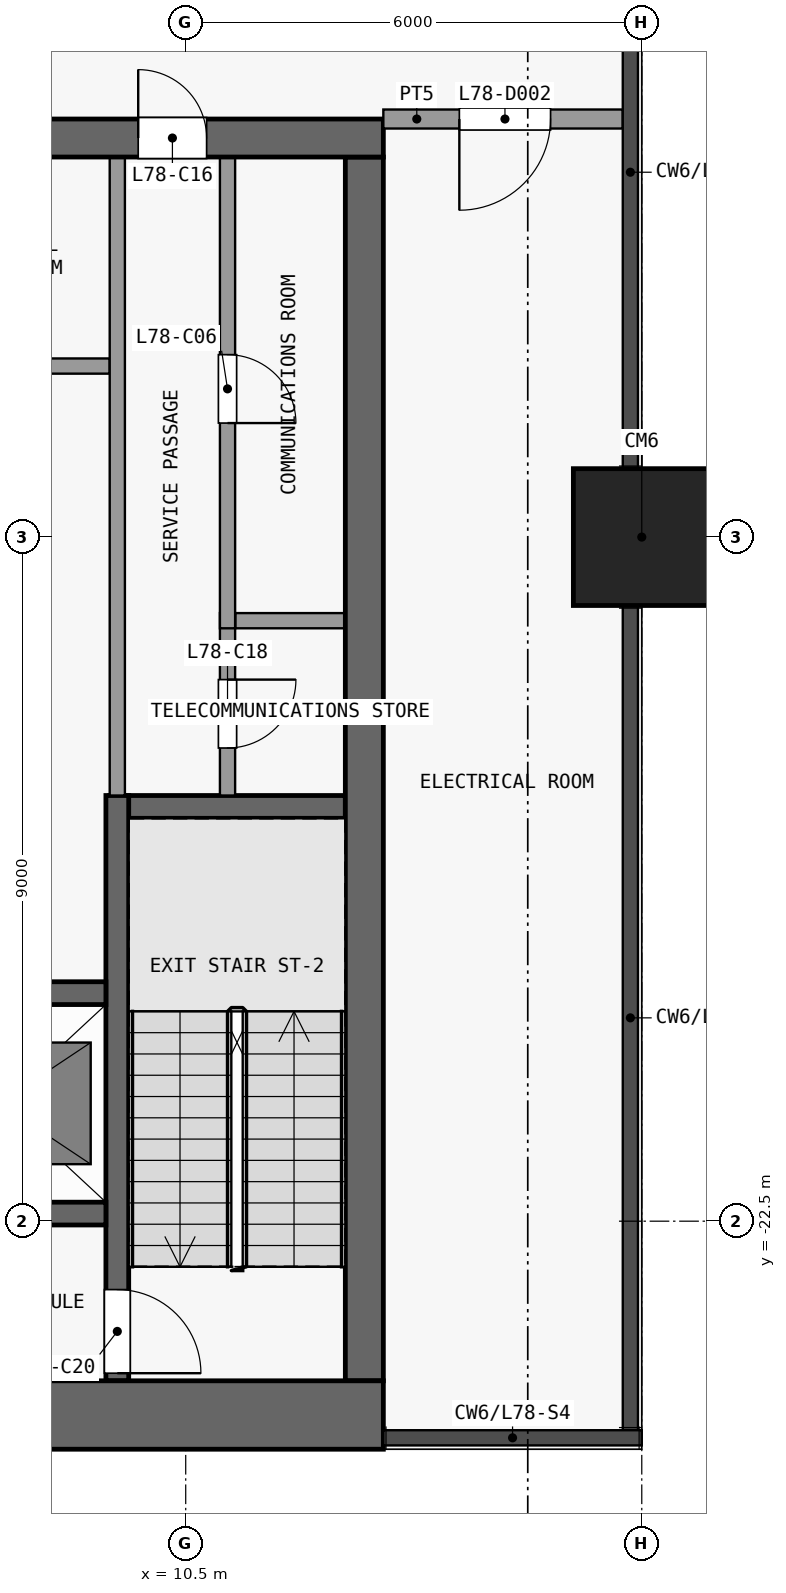
"""IFC4 building model, lengths in metres.
Left out: names, types, materials, properties, quantities, classifications, styles, units other than length and angle.
Written with IfcOpenShell. Run it as: python <this file> out.ifc"""

import sys

from ifc_helpers import new_model, si_unit, direction, frame, frame_2d, origin, origin_2d, place, context, subcontext, project, spatial, rectangle, extrude, element, fill, save


model = new_model("IFC4")
c1 = context("Model", 3, precision=1e-05, world=origin(), true_north=direction((0.0, 1.0)))
c2 = subcontext(c1, "Body", "Model", "MODEL_VIEW")
j1 = project(units=[si_unit("LENGTHUNIT", "METRE"), si_unit("PLANEANGLEUNIT", "RADIAN")], contexts=[c1])
p1 = place(None, origin())
s1 = spatial("IfcSite", under=j1, at=p1, CompositionType="ELEMENT")
p2 = place(p1, origin())
s2 = spatial("IfcBuilding", under=s1, at=p2, CompositionType="ELEMENT")
p3 = place(p2, frame((0.0, 0.0, 307.7)))
s3 = spatial("IfcBuildingStorey", under=s2, at=p3, CompositionType="ELEMENT", Elevation=307.7)
p4 = place(p3, frame((16.5, -13.5, 0.0), z_axis=(0.0, 0.0, 1.0), x_axis=(1.0, 0.0, 0.0)))
e1 = element("IfcColumn", 1, at=p4, inside=s3, PredefinedType="COLUMN", context=c2, shape_type="SweptSolid", body=[
    extrude(rectangle(XDim=1.8, YDim=1.8, at=origin_2d()), origin(), (0.0, 0.0, 1.0), 4.5),
])
p5 = place(p3, frame((-13.1, -25.05, 0.0), z_axis=(0.0, 0.0, 1.0), x_axis=(1.0, 0.0, 0.0)))
e2 = element("IfcWall", 2, at=p5, inside=s3, PredefinedType="SHEAR", context=c2, shape_type="SweptSolid", body=[
    extrude(rectangle(XDim=26.2, YDim=0.9, at=frame_2d((13.1, 0.0))), origin(), (0.0, 0.0, 1.0), 4.1),
])
p6 = place(p3, frame((-13.1, -8.25, 0.0), z_axis=(0.0, 0.0, 1.0), x_axis=(1.0, 0.0, 0.0)))
e3 = element("IfcWall", 3, at=p6, inside=s3, PredefinedType="SHEAR", context=c2, shape_type="SweptSolid", body=[
    extrude(rectangle(XDim=26.2, YDim=0.5, at=frame_2d((13.1, 0.0))), origin(), (0.0, 0.0, 1.0), 4.1),
])
p7 = place(p6, frame((7.4, 0.0, 0.0)))
e4 = element("IfcOpeningElement", 4, at=p7, cuts=e3, PredefinedType="OPENING", context=c2, shape_type="SweptSolid", body=[
    extrude(rectangle(XDim=1.8, YDim=2.1, at=frame_2d((0.9, 1.05))), frame((0.0, 0.26, 0.0), z_axis=(0.0, -1.0, 0.0), x_axis=(1.0, 0.0, 0.0)), (0.0, 0.0, 1.0), 0.52),
])
p8 = place(p6, frame((17.0, 0.0, 0.0)))
e5 = element("IfcOpeningElement", 5, at=p8, cuts=e3, PredefinedType="OPENING", context=c2, shape_type="SweptSolid", body=[
    extrude(rectangle(XDim=1.8, YDim=2.1, at=frame_2d((0.9, 1.05))), frame((0.0, 0.26, 0.0), z_axis=(0.0, -1.0, 0.0), x_axis=(1.0, 0.0, 0.0)), (0.0, 0.0, 1.0), 0.52),
])
p9 = place(p6, frame((1.325, 0.0, 0.0)))
e6 = element("IfcOpeningElement", 6, at=p9, cuts=e3, PredefinedType="OPENING", context=c2, shape_type="SweptSolid", body=[
    extrude(rectangle(XDim=1.2, YDim=2.1, at=frame_2d((0.6, 1.05))), frame((0.0, 0.26, 0.0), z_axis=(0.0, -1.0, 0.0), x_axis=(1.0, 0.0, 0.0)), (0.0, 0.0, 1.0), 0.52),
])
p10 = place(p6, frame((22.975, 0.0, 0.0)))
e7 = element("IfcOpeningElement", 7, at=p10, cuts=e3, PredefinedType="OPENING", context=c2, shape_type="SweptSolid", body=[
    extrude(rectangle(XDim=0.9, YDim=2.1, at=frame_2d((0.45, 1.05))), frame((0.0, 0.26, 0.0), z_axis=(0.0, -1.0, 0.0), x_axis=(1.0, 0.0, 0.0)), (0.0, 0.0, 1.0), 0.52),
])
p11 = place(p3, frame((12.85, -24.6, 0.0), z_axis=(0.0, 0.0, 1.0), x_axis=(0.0, 1.0, 0.0)))
e8 = element("IfcWall", 8, at=p11, inside=s3, PredefinedType="SHEAR", context=c2, shape_type="SweptSolid", body=[
    extrude(rectangle(XDim=16.1, YDim=0.5, at=frame_2d((8.05, 0.0))), origin(), (0.0, 0.0, 1.0), 4.1),
])
p12 = place(p3, frame((6.35, -22.4, 0.0), z_axis=(0.0, 0.0, 1.0), x_axis=(1.0, 0.0, 0.0)))
e9 = element("IfcWall", 9, at=p12, inside=s3, PredefinedType="SHEAR", context=c2, shape_type="SweptSolid", body=[
    extrude(rectangle(XDim=3.1, YDim=0.3, at=frame_2d((1.55, 0.0))), origin(), (0.0, 0.0, 1.0), 4.1),
])
p13 = place(p3, frame((6.4, -19.5, 0.0), z_axis=(0.0, 0.0, 1.0), x_axis=(1.0, 0.0, 0.0)))
e10 = element("IfcWall", 10, at=p13, inside=s3, PredefinedType="SHEAR", context=c2, shape_type="SweptSolid", body=[
    extrude(rectangle(XDim=3.05, YDim=0.3, at=frame_2d((1.525, 0.0))), origin(), (0.0, 0.0, 1.0), 4.1),
])
p14 = place(p3, frame((9.5, -17.05, 0.0), z_axis=(0.0, 0.0, 1.0), x_axis=(1.0, 0.0, 0.0)))
e11 = element("IfcWall", 11, at=p14, inside=s3, PredefinedType="SHEAR", context=c2, shape_type="SweptSolid", body=[
    extrude(rectangle(XDim=3.1, YDim=0.3, at=frame_2d((1.55, 0.0))), origin(), (0.0, 0.0, 1.0), 4.1),
])
p15 = place(p3, frame((11.15, -14.6, 0.0), z_axis=(0.0, 0.0, 1.0), x_axis=(1.0, 0.0, 0.0)))
e12 = element("IfcWall", 12, at=p15, inside=s3, PredefinedType="PARTITIONING", context=c2, shape_type="SweptSolid", body=[
    extrude(rectangle(XDim=1.45, YDim=0.2, at=frame_2d((0.725, 0.0))), origin(), (0.0, 0.0, 1.0), 4.1),
])
p16 = place(p3, frame((6.6, -11.25, 0.0), z_axis=(0.0, 0.0, 1.0), x_axis=(1.0, 0.0, 0.0)))
e13 = element("IfcWall", 13, at=p16, inside=s3, PredefinedType="PARTITIONING", context=c2, shape_type="SweptSolid", body=[
    extrude(rectangle(XDim=2.9, YDim=0.2, at=frame_2d((1.45, 0.0))), origin(), (0.0, 0.0, 1.0), 4.1),
])
p17 = place(p3, frame((9.6, -16.9, 0.0), z_axis=(0.0, 0.0, 1.0), x_axis=(0.0, -1.0, 0.0)))
e14 = element("IfcWall", 14, at=p17, inside=s3, PredefinedType="SHEAR", context=c2, shape_type="SweptSolid", body=[
    extrude(rectangle(XDim=7.7, YDim=0.3, at=frame_2d((3.85, 0.0))), origin(), (0.0, 0.0, 1.0), 4.1),
])
p18 = place(p17, frame((6.5, 0.0, 0.0)))
e15 = element("IfcOpeningElement", 15, at=p18, cuts=e14, PredefinedType="OPENING", context=c2, shape_type="SweptSolid", body=[
    extrude(rectangle(XDim=1.1, YDim=2.1, at=frame_2d((0.55, 1.05))), frame((0.0, 0.16, 0.0), z_axis=(0.0, -1.0, 0.0), x_axis=(1.0, 0.0, 0.0)), (0.0, 0.0, 1.0), 0.32),
])
p19 = place(p3, frame((9.6, -16.9, 0.0), z_axis=(0.0, 0.0, 1.0), x_axis=(0.0, 1.0, 0.0)))
e16 = element("IfcWall", 16, at=p19, inside=s3, PredefinedType="PARTITIONING", context=c2, shape_type="SweptSolid", body=[
    extrude(rectangle(XDim=8.4, YDim=0.2, at=frame_2d((4.2, 0.0))), origin(), (0.0, 0.0, 1.0), 4.1),
])
p20 = place(p3, frame((11.05, -14.5, 0.0), z_axis=(0.0, 0.0, 1.0), x_axis=(0.0, -1.0, 0.0)))
e17 = element("IfcWall", 17, at=p20, inside=s3, PredefinedType="PARTITIONING", context=c2, shape_type="SweptSolid", body=[
    extrude(rectangle(XDim=2.4, YDim=0.2, at=frame_2d((1.2, 0.0))), origin(), (0.0, 0.0, 1.0), 4.1),
])
p21 = place(p20, frame((0.875, 0.0, 0.0)))
e18 = element("IfcOpeningElement", 18, at=p21, cuts=e17, PredefinedType="OPENING", context=c2, shape_type="SweptSolid", body=[
    extrude(rectangle(XDim=0.9, YDim=2.1, at=frame_2d((0.45, 1.05))), frame((0.0, 0.11, 0.0), z_axis=(0.0, -1.0, 0.0), x_axis=(1.0, 0.0, 0.0)), (0.0, 0.0, 1.0), 0.22),
])
p22 = place(p3, frame((11.05, -8.5, 0.0), z_axis=(0.0, 0.0, 1.0), x_axis=(0.0, -1.0, 0.0)))
e19 = element("IfcWall", 19, at=p22, inside=s3, PredefinedType="PARTITIONING", context=c2, shape_type="SweptSolid", body=[
    extrude(rectangle(XDim=6.2, YDim=0.2, at=frame_2d((3.1, 0.0))), origin(), (0.0, 0.0, 1.0), 4.1),
])
p23 = place(p22, frame((2.6, 0.0, 0.0)))
e20 = element("IfcOpeningElement", 20, at=p23, cuts=e19, PredefinedType="OPENING", context=c2, shape_type="SweptSolid", body=[
    extrude(rectangle(XDim=0.9, YDim=2.1, at=frame_2d((0.45, 1.05))), frame((0.0, 0.11, 0.0), z_axis=(0.0, -1.0, 0.0), x_axis=(1.0, 0.0, 0.0)), (0.0, 0.0, 1.0), 0.22),
])
p24 = place(p3, frame((13.1, -8.0, 0.0), z_axis=(0.0, 0.0, 1.0), x_axis=(1.0, 0.0, 0.0)))
e21 = element("IfcWall", 21, at=p24, inside=s3, PredefinedType="PARTITIONING", context=c2, shape_type="SweptSolid", body=[
    extrude(rectangle(XDim=3.15, YDim=0.25, at=frame_2d((1.575, 0.0))), origin(), (0.0, 0.0, 1.0), 4.1),
])
p25 = place(p24, frame((1.0, 0.0, 0.0)))
e22 = element("IfcOpeningElement", 22, at=p25, cuts=e21, PredefinedType="OPENING", context=c2, shape_type="SweptSolid", body=[
    extrude(rectangle(XDim=1.2, YDim=2.1, at=frame_2d((0.6, 1.05))), frame((0.0, 0.135, 0.0), z_axis=(0.0, -1.0, 0.0), x_axis=(1.0, 0.0, 0.0)), (0.0, 0.0, 1.0), 0.27),
])
p26 = place(p23, origin())
e23 = element("IfcDoor", 23, at=p26, inside=s3, OperationType="SINGLE_SWING_RIGHT", PredefinedType="DOOR", context=c2, shape_type="SweptSolid", body=[
    extrude(rectangle(XDim=0.9, YDim=2.1, at=frame_2d((0.45, 1.05))), frame((0.0, 0.025, 0.0), z_axis=(0.0, -1.0, 0.0), x_axis=(1.0, 0.0, 0.0)), (0.0, 0.0, 1.0), 0.05),
])
fill(e20, e23)
p27 = place(p10, origin())
e24 = element("IfcDoor", 24, at=p27, inside=s3, OperationType="SINGLE_SWING_LEFT", PredefinedType="DOOR", context=c2, shape_type="SweptSolid", body=[
    extrude(rectangle(XDim=0.9, YDim=2.1, at=frame_2d((0.45, 1.05))), frame((0.0, 0.025, 0.0), z_axis=(0.0, -1.0, 0.0), x_axis=(1.0, 0.0, 0.0)), (0.0, 0.0, 1.0), 0.05),
])
fill(e7, e24)
p28 = place(p21, origin())
e25 = element("IfcDoor", 25, at=p28, inside=s3, OperationType="SINGLE_SWING_LEFT", PredefinedType="DOOR", context=c2, shape_type="SweptSolid", body=[
    extrude(rectangle(XDim=0.9, YDim=2.1, at=frame_2d((0.45, 1.05))), frame((0.0, 0.025, 0.0), z_axis=(0.0, -1.0, 0.0), x_axis=(1.0, 0.0, 0.0)), (0.0, 0.0, 1.0), 0.05),
])
fill(e18, e25)
p29 = place(p18, origin())
e26 = element("IfcDoor", 26, at=p29, inside=s3, OperationType="SINGLE_SWING_RIGHT", PredefinedType="DOOR", context=c2, shape_type="SweptSolid", body=[
    extrude(rectangle(XDim=1.1, YDim=2.1, at=frame_2d((0.55, 1.05))), frame((0.0, 0.025, 0.0), z_axis=(0.0, -1.0, 0.0), x_axis=(1.0, 0.0, 0.0)), (0.0, 0.0, 1.0), 0.05),
])
fill(e15, e26)
p30 = place(p25, origin())
e27 = element("IfcDoor", 27, at=p30, inside=s3, OperationType="SINGLE_SWING_LEFT", PredefinedType="DOOR", context=c2, shape_type="SweptSolid", body=[
    extrude(rectangle(XDim=1.2, YDim=2.1, at=frame_2d((0.6, 1.05))), frame((0.0, 0.025, 0.0), z_axis=(0.0, -1.0, 0.0), x_axis=(1.0, 0.0, 0.0)), (0.0, 0.0, 1.0), 0.05),
])
fill(e22, e27)
save(model, sys.argv[1])
